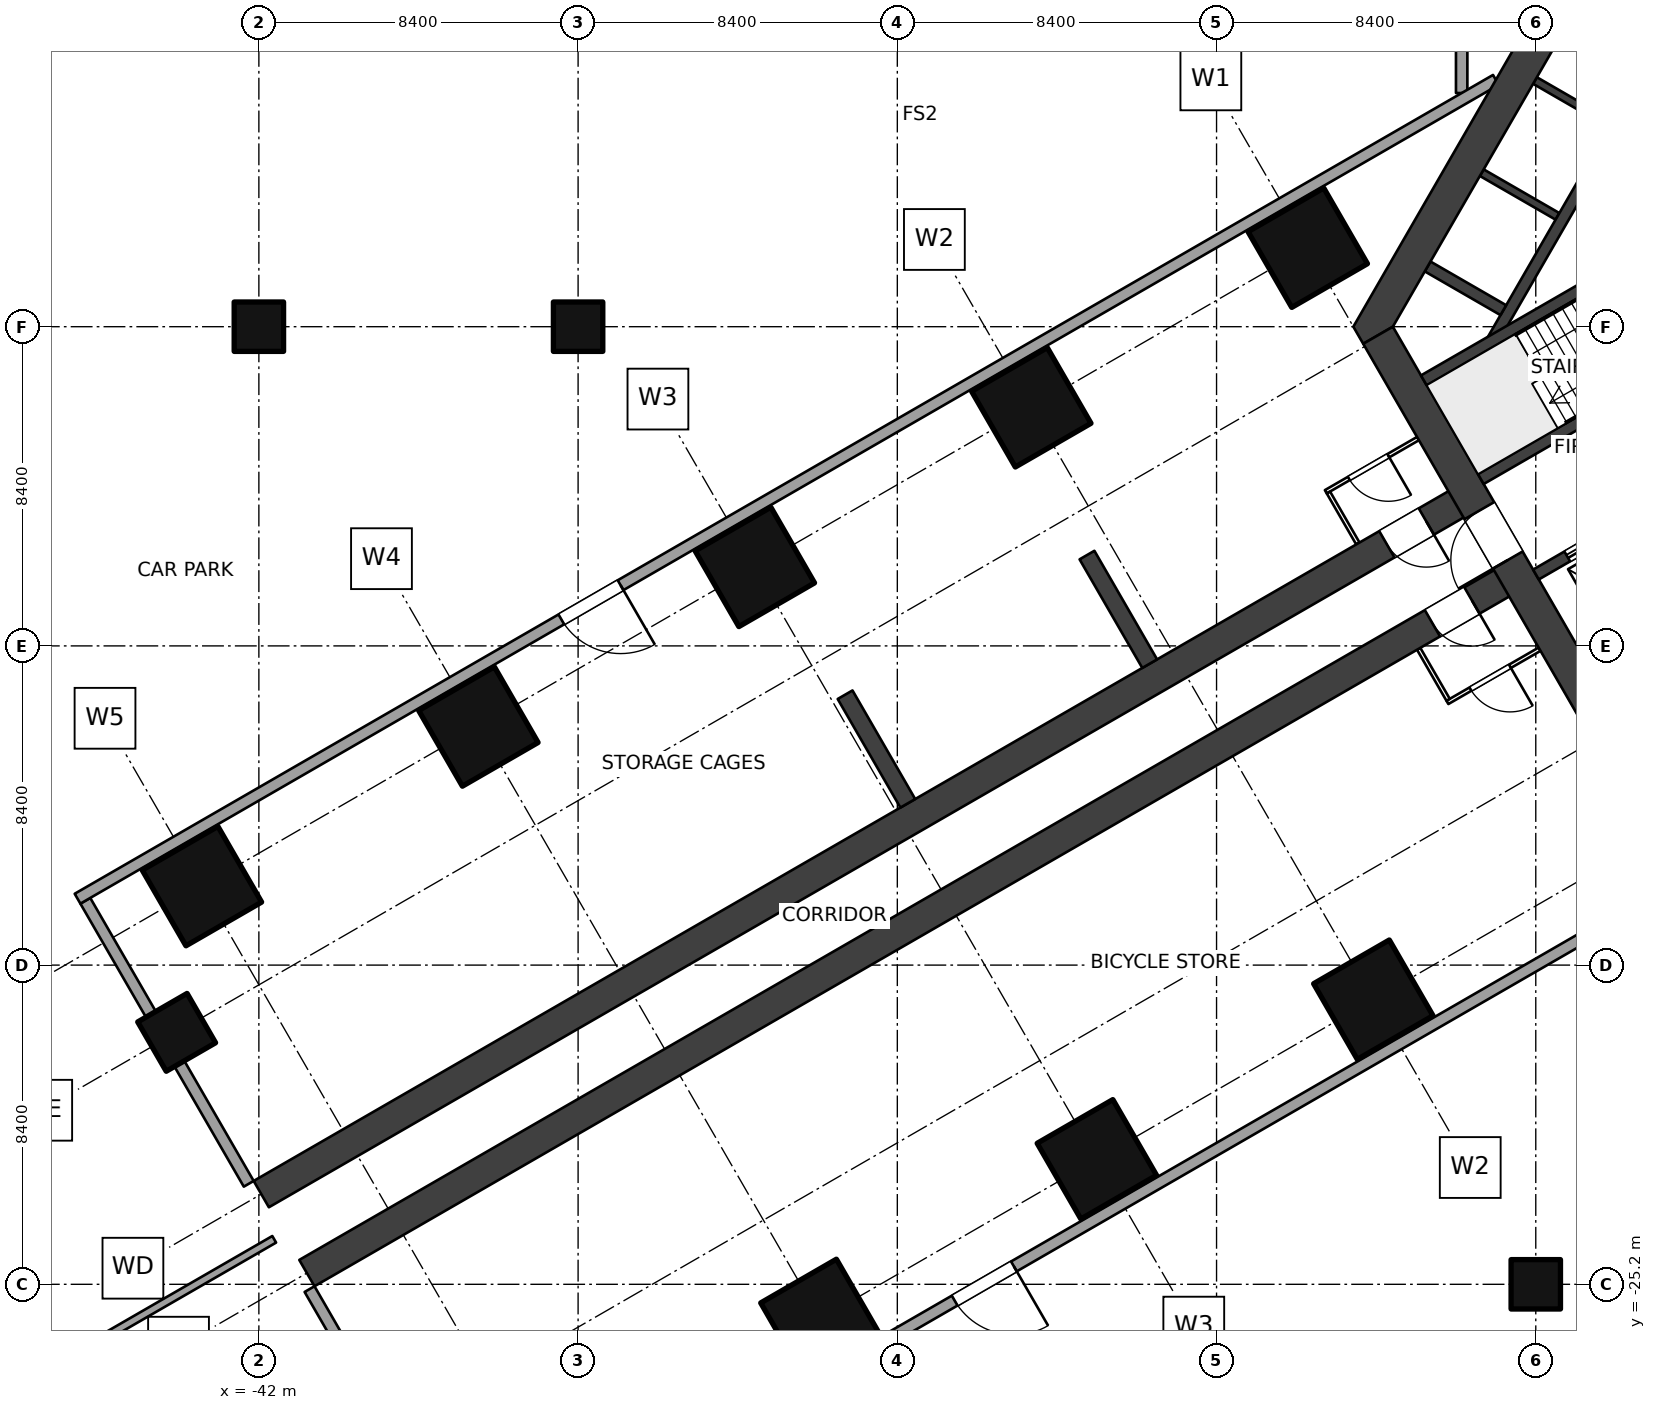
"""IFC4 building model, lengths in metres.
Left out: names, types, materials, properties, quantities, classifications, styles, units other than length and angle.
Written with IfcOpenShell. Run it as: python <this file> out.ifc"""

import sys

from ifc_helpers import new_model, si_unit, direction, frame, frame_2d, origin, origin_2d, place, context, subcontext, project, spatial, polyline, rectangle, outline, extrude, element, fill, save


model = new_model("IFC4")
c1 = context("Model", 3, precision=1e-05, world=origin(), true_north=direction((0.0, 1.0)))
c2 = subcontext(c1, "Body", "Model", "MODEL_VIEW")
j1 = project(units=[si_unit("LENGTHUNIT", "METRE"), si_unit("PLANEANGLEUNIT", "RADIAN")], contexts=[c1])
p1 = place(None, origin())
s1 = spatial("IfcSite", under=j1, at=p1, CompositionType="ELEMENT")
p2 = place(p1, origin())
s2 = spatial("IfcBuilding", under=s1, at=p2, CompositionType="ELEMENT")
p3 = place(p2, frame((0.0, 0.0, -3.5)))
s3 = spatial("IfcBuildingStorey", under=s2, at=p3, CompositionType="ELEMENT", Elevation=-3.5)
for number, where, z_axis, x_axis in (
    (1, (-14.4, 2.078, 0.0), (0.0, 0.0, 1.0), (-0.5, 0.866, 0.0)),
    (2, (-12.675, -17.71, 0.0), (0.0, 0.0, 1.0), (-0.5, 0.866, 0.0)),
    (3, (-21.675, -2.122, 0.0), (0.0, 0.0, 1.0), (-0.5, 0.866, 0.0)),
    (4, (-19.949, -21.91, 0.0), (0.0, 0.0, 1.0), (-0.5, 0.866, 0.0)),
    (5, (-28.949, -6.322, 0.0), (0.0, 0.0, 1.0), (-0.5, 0.866, 0.0)),
    (6, (-27.224, -26.11, 0.0), (0.0, 0.0, 1.0), (-0.5, 0.866, 0.0)),
    (7, (-36.224, -10.521, 0.0), (0.0, 0.0, 1.0), (-0.5, 0.866, 0.0)),
    (8, (-43.499, -14.721, 0.0), (0.0, 0.0, 1.0), (-0.5, 0.866, 0.0)),
):
    element("IfcColumn", number, at=place(p3, frame(where, z_axis=z_axis, x_axis=x_axis)), inside=s3, PredefinedType="COLUMN", context=c2, shape_type="SweptSolid", body=[
        extrude(rectangle(XDim=2.3, YDim=2.3, at=origin_2d()), origin(), (0.0, 0.0, 1.0), 3.5),
    ])
p4 = place(p3, frame((-44.164, -18.57, 0.0), z_axis=(0.0, 0.0, 1.0), x_axis=(-0.5, 0.866025403784, 0.0)))
e9 = element("IfcColumn", 9, at=p4, inside=s3, PredefinedType="COLUMN", context=c2, shape_type="SweptSolid", body=[
    extrude(rectangle(XDim=1.5, YDim=1.5, at=origin_2d()), origin(), (0.0, 0.0, 1.0), 3.5),
])
for number, where, z_axis, x_axis in (
    (10, (-42.0, 0.0, 0.0), (0.0, 0.0, 1.0), (1.0, 0.0, 0.0)),
    (11, (-33.6, 0.0, 0.0), (0.0, 0.0, 1.0), (1.0, 0.0, 0.0)),
    (12, (-8.4, -25.2, 0.0), (0.0, 0.0, 1.0), (1.0, 0.0, 0.0)),
):
    element("IfcColumn", number, at=place(p3, frame(where, z_axis=z_axis, x_axis=x_axis)), inside=s3, PredefinedType="COLUMN", context=c2, shape_type="SweptSolid", body=[
        extrude(rectangle(XDim=1.3, YDim=1.3, at=origin_2d()), origin(), (0.0, 0.0, 1.0), 3.5),
    ])
p5 = place(p3, frame((-6.47, -10.757, 0.0), z_axis=(0.0, 0.0, 1.0), x_axis=(-0.499997612506, 0.8660267822, 0.0)))
e13 = element("IfcWall", 13, at=p5, inside=s3, PredefinedType="SHEAR", context=c2, shape_type="SweptSolid", body=[
    extrude(rectangle(XDim=12.161, YDim=0.9, at=frame_2d((6.08, 0.0))), origin(), (0.0, 0.0, 1.0), 3.5),
])
p6 = place(p5, frame((5.33, 0.0, 0.0)))
e14 = element("IfcOpeningElement", 14, at=p6, cuts=e13, PredefinedType="OPENING", context=c2, shape_type="SweptSolid", body=[
    extrude(rectangle(XDim=1.5, YDim=2.1, at=frame_2d((0.75, 1.05))), frame((0.0, 0.46, 0.0), z_axis=(0.0, -1.0, 0.0), x_axis=(1.0, 0.0, 0.0)), (0.0, 0.0, 1.0), 0.92),
])
p7 = place(p3, origin())
e15 = element("IfcWall", 15, at=p7, inside=s3, PredefinedType="SHEAR", context=c2, shape_type="SweptSolid", body=[
    extrude(outline(polyline([(-6.6, 11.432), (-13.2, 0.0), (-12.94, -0.45), (-12.161, 0.0), (-6.08, 10.531), (-6.08, 11.432), (-6.6, 11.432)])), origin(), (0.0, 0.0, 1.0), 3.5),
])
p8 = place(p3, frame((-3.869, -0.559, 0.0), z_axis=(0.0, 0.0, 1.0), x_axis=(-0.86602711848, -0.499997030048, 0.0)))
e16 = element("IfcWall", 16, at=p8, inside=s3, PredefinedType="SHEAR", context=c2, shape_type="SweptSolid", body=[
    extrude(rectangle(XDim=6.901, YDim=0.3, at=frame_2d((3.451, 0.0))), origin(), (0.0, 0.0, 1.0), 3.5),
])
p9 = place(p8, frame((0.25, 0.0, 0.0)))
e17 = element("IfcOpeningElement", 17, at=p9, cuts=e16, PredefinedType="OPENING", context=c2, shape_type="SweptSolid", body=[
    extrude(rectangle(XDim=1.0, YDim=2.1, at=frame_2d((0.5, 1.05))), frame((0.0, 0.16, 0.0), z_axis=(0.0, -1.0, 0.0), x_axis=(1.0, 0.0, 0.0)), (0.0, 0.0, 1.0), 0.32),
])
p10 = place(p3, frame((-5.369, 2.039, 0.0), z_axis=(0.0, 0.0, 1.0), x_axis=(-0.86602711848, -0.499997030048, 0.0)))
e18 = element("IfcWall", 18, at=p10, inside=s3, PredefinedType="SHEAR", context=c2, shape_type="SweptSolid", body=[
    extrude(rectangle(XDim=6.901, YDim=0.3, at=frame_2d((3.451, 0.0))), origin(), (0.0, 0.0, 1.0), 3.5),
])
p11 = place(p3, frame((-2.419, -3.071, 0.0), z_axis=(0.0, 0.0, 1.0), x_axis=(-0.86602711848, -0.499997030048, 0.0)))
e19 = element("IfcWall", 19, at=p11, inside=s3, PredefinedType="SHEAR", context=c2, shape_type="SweptSolid", body=[
    extrude(rectangle(XDim=6.901, YDim=0.3, at=frame_2d((3.451, 0.0))), origin(), (0.0, 0.0, 1.0), 3.5),
])
p12 = place(p11, frame((4.85, 0.0, 0.0)))
e20 = element("IfcOpeningElement", 20, at=p12, cuts=e19, PredefinedType="OPENING", context=c2, shape_type="SweptSolid", body=[
    extrude(rectangle(XDim=1.1, YDim=2.1, at=frame_2d((0.55, 1.05))), frame((0.0, 0.16, 0.0), z_axis=(0.0, -1.0, 0.0), x_axis=(1.0, 0.0, 0.0)), (0.0, 0.0, 1.0), 0.32),
])
p13 = place(p3, frame((-9.548, -0.374, 0.0), z_axis=(0.0, 0.0, 1.0), x_axis=(0.500002290144, 0.866024081565, 0.0)))
e21 = element("IfcWall", 21, at=p13, inside=s3, PredefinedType="SHEAR", context=c2, shape_type="SweptSolid", body=[
    extrude(rectangle(XDim=10.195, YDim=0.3, at=frame_2d((5.098, 0.0))), origin(), (0.0, 0.0, 1.0), 3.5),
])
p14 = place(p3, frame((-9.254, 0.435, 0.0), z_axis=(0.0, 0.0, 1.0), x_axis=(-0.866007057882, 0.500031774688, 0.0)))
e22 = element("IfcWall", 22, at=p14, inside=s3, PredefinedType="SHEAR", context=c2, shape_type="SweptSolid", body=[
    extrude(rectangle(XDim=2.3, YDim=0.3, at=frame_2d((1.15, 0.0))), origin(), (0.0, 0.0, 1.0), 3.5),
])
for number, where, z_axis, x_axis in (
    (23, (-7.829, 2.903, 0.0), (0.0, 0.0, 1.0), (-0.866, 0.5, 0.0)),
    (24, (-6.429, 5.328, 0.0), (0.0, 0.0, 1.0), (-0.866, 0.5, 0.0)),
):
    element("IfcWall", number, at=place(p3, frame(where, z_axis=z_axis, x_axis=x_axis)), inside=s3, PredefinedType="SHEAR", context=c2, shape_type="SweptSolid", body=[
        extrude(rectangle(XDim=2.3, YDim=0.2, at=frame_2d((1.15, 0.0))), origin(), (0.0, 0.0, 1.0), 3.5),
    ])
p15 = place(p3, frame((-8.91, -6.53, 0.0), z_axis=(0.0, 0.0, 1.0), x_axis=(-0.866025284237, -0.500000207062, 0.0)))
e25 = element("IfcWall", 25, at=p15, inside=s3, PredefinedType="SHEAR", context=c2, shape_type="SweptSolid", body=[
    extrude(rectangle(XDim=36.75, YDim=0.8, at=frame_2d((18.375, 0.0))), origin(), (0.0, 0.0, 1.0), 3.5),
])
p16 = place(p15, frame((1.35, 0.0, 0.0)))
e26 = element("IfcOpeningElement", 26, at=p16, cuts=e25, PredefinedType="OPENING", context=c2, shape_type="SweptSolid", body=[
    extrude(rectangle(XDim=1.2, YDim=2.1, at=frame_2d((0.6, 1.05))), frame((0.0, 0.41, 0.0), z_axis=(0.0, -1.0, 0.0), x_axis=(1.0, 0.0, 0.0)), (0.0, 0.0, 1.0), 0.82),
])
p17 = place(p3, frame((-10.11, -4.451, 0.0), z_axis=(0.0, 0.0, 1.0), x_axis=(-0.866025284237, -0.500000207062, 0.0)))
e27 = element("IfcWall", 27, at=p17, inside=s3, PredefinedType="SHEAR", context=c2, shape_type="SweptSolid", body=[
    extrude(rectangle(XDim=36.75, YDim=0.8, at=frame_2d((18.375, 0.0))), origin(), (0.0, 0.0, 1.0), 3.5),
])
p18 = place(p17, frame((1.35, 0.0, 0.0)))
e28 = element("IfcOpeningElement", 28, at=p18, cuts=e27, PredefinedType="OPENING", context=c2, shape_type="SweptSolid", body=[
    extrude(rectangle(XDim=1.2, YDim=2.1, at=frame_2d((0.6, 1.05))), frame((0.0, 0.41, 0.0), z_axis=(0.0, -1.0, 0.0), x_axis=(1.0, 0.0, 0.0)), (0.0, 0.0, 1.0), 0.82),
])
p19 = place(p3, frame((-8.3, -8.487, 0.0), z_axis=(0.0, 0.0, 1.0), x_axis=(-0.866034573852, -0.49998411664, 0.0)))
e29 = element("IfcWall", 29, at=p19, inside=s3, PredefinedType="PARTITIONING", context=c2, shape_type="SweptSolid", body=[
    extrude(rectangle(XDim=2.8, YDim=0.1, at=frame_2d((1.4, 0.0))), origin(), (0.0, 0.0, 1.0), 3.15),
])
p20 = place(p19, frame((0.9, 0.0, 0.0)))
e30 = element("IfcOpeningElement", 30, at=p20, cuts=e29, PredefinedType="OPENING", context=c2, shape_type="SweptSolid", body=[
    extrude(rectangle(XDim=1.2, YDim=2.1, at=frame_2d((0.6, 1.05))), frame((0.0, 0.06, 0.0), z_axis=(0.0, -1.0, 0.0), x_axis=(1.0, 0.0, 0.0)), (0.0, 0.0, 1.0), 0.12),
])
p21 = place(p3, frame((-11.482, -8.476, 0.0), z_axis=(0.0, 0.0, 1.0), x_axis=(0.500017819788, -0.86601511528, 0.0)))
e31 = element("IfcWall", 31, at=p21, inside=s3, PredefinedType="PARTITIONING", context=c2, shape_type="SweptSolid", body=[
    extrude(rectangle(XDim=1.55, YDim=0.1, at=frame_2d((0.775, 0.0))), origin(), (0.0, 0.0, 1.0), 3.15),
])
p22 = place(p3, frame((-11.5, -2.945, 0.0), z_axis=(0.0, 0.0, 1.0), x_axis=(-0.866034573852, -0.49998411664, 0.0)))
e32 = element("IfcWall", 32, at=p22, inside=s3, PredefinedType="PARTITIONING", context=c2, shape_type="SweptSolid", body=[
    extrude(rectangle(XDim=2.8, YDim=0.1, at=frame_2d((1.4, 0.0))), origin(), (0.0, 0.0, 1.0), 3.15),
])
p23 = place(p22, frame((0.9, 0.0, 0.0)))
e33 = element("IfcOpeningElement", 33, at=p23, cuts=e32, PredefinedType="OPENING", context=c2, shape_type="SweptSolid", body=[
    extrude(rectangle(XDim=1.2, YDim=2.1, at=frame_2d((0.6, 1.05))), frame((0.0, 0.06, 0.0), z_axis=(0.0, -1.0, 0.0), x_axis=(1.0, 0.0, 0.0)), (0.0, 0.0, 1.0), 0.12),
])
p24 = place(p3, frame((-13.082, -5.705, 0.0), z_axis=(0.0, 0.0, 1.0), x_axis=(-0.500086022567, 0.865975732936, 0.0)))
e34 = element("IfcWall", 34, at=p24, inside=s3, PredefinedType="PARTITIONING", context=c2, shape_type="SweptSolid", body=[
    extrude(rectangle(XDim=1.55, YDim=0.1, at=frame_2d((0.775, 0.0))), origin(), (0.0, 0.0, 1.0), 3.15),
])
p25 = place(p3, frame((-41.596, -24.016, 0.0), z_axis=(0.0, 0.0, 1.0), x_axis=(-0.866034858292, -0.499983623955, 0.0)))
e35 = element("IfcWall", 35, at=p25, inside=s3, PredefinedType="SOLIDWALL", context=c2, shape_type="SweptSolid", body=[
    extrude(rectangle(XDim=10.627, YDim=0.2, at=frame_2d((5.313, 0.0))), origin(), (0.0, 0.0, 1.0), 3.15),
])
for number, where, z_axis, x_axis in (
    (36, (-40.667, -25.326, 0.0), (0.0, 0.0, 1.0), (0.5, -0.866, 0.0)),
    (37, (-42.267, -22.555, 0.0), (0.0, 0.0, 1.0), (-0.5, 0.866, 0.0)),
):
    element("IfcWall", number, at=place(p3, frame(where, z_axis=z_axis, x_axis=x_axis)), inside=s3, PredefinedType="SOLIDWALL", context=c2, shape_type="SweptSolid", body=[
        extrude(rectangle(XDim=8.6, YDim=0.3, at=frame_2d((4.3, 0.0))), origin(), (0.0, 0.0, 1.0), 1.55),
    ])
p26 = place(p3, frame((-10.35, 6.149, 0.0), z_axis=(0.0, 0.0, 1.0), x_axis=(0.0, 1.0, 0.0)))
e38 = element("IfcWall", 38, at=p26, inside=s3, PredefinedType="SOLIDWALL", context=c2, shape_type="SweptSolid", body=[
    extrude(rectangle(XDim=41.883, YDim=0.3, at=frame_2d((20.941, 0.0))), origin(), (0.0, 0.0, 1.0), 3.15),
])
p27 = place(p26, frame((25.383, 0.0, 0.0)))
e39 = element("IfcOpeningElement", 39, at=p27, cuts=e38, PredefinedType="OPENING", context=c2, shape_type="SweptSolid", body=[
    extrude(rectangle(XDim=1.8, YDim=2.4, at=frame_2d((0.9, 1.2))), frame((0.0, 0.16, 0.0), z_axis=(0.0, -1.0, 0.0), x_axis=(1.0, 0.0, 0.0)), (0.0, 0.0, 1.0), 0.32),
])
p28 = place(p3, frame((-0.15, -12.038, 0.0), z_axis=(0.0, 0.0, 1.0), x_axis=(-0.866026292622, -0.499998460486, 0.0)))
e40 = element("IfcWall", 40, at=p28, inside=s3, PredefinedType="SOLIDWALL", context=c2, shape_type="SweptSolid", body=[
    extrude(rectangle(XDim=41.883, YDim=0.3, at=frame_2d((20.941, 0.0))), origin(), (0.0, 0.0, 1.0), 3.15),
])
p29 = place(p28, frame((25.383, 0.0, 0.0)))
e41 = element("IfcOpeningElement", 41, at=p29, cuts=e40, PredefinedType="OPENING", context=c2, shape_type="SweptSolid", body=[
    extrude(rectangle(XDim=1.8, YDim=2.4, at=frame_2d((0.9, 1.2))), frame((0.0, 0.16, 0.0), z_axis=(0.0, -1.0, 0.0), x_axis=(1.0, 0.0, 0.0)), (0.0, 0.0, 1.0), 0.32),
])
p30 = place(p3, frame((-9.45, 6.495, 0.0), z_axis=(0.0, 0.0, 1.0), x_axis=(-0.866025301493, -0.500000177174, 0.0)))
e42 = element("IfcWall", 42, at=p30, inside=s3, PredefinedType="SOLIDWALL", context=c2, shape_type="SweptSolid", body=[
    extrude(rectangle(XDim=43.095, YDim=0.3, at=frame_2d((21.548, 0.0))), origin(), (0.0, 0.0, 1.0), 3.15),
])
p31 = place(p30, frame((26.595, 0.0, 0.0)))
e43 = element("IfcOpeningElement", 43, at=p31, cuts=e42, PredefinedType="OPENING", context=c2, shape_type="SweptSolid", body=[
    extrude(rectangle(XDim=1.8, YDim=2.4, at=frame_2d((0.9, 1.2))), frame((0.0, 0.16, 0.0), z_axis=(0.0, -1.0, 0.0), x_axis=(1.0, 0.0, 0.0)), (0.0, 0.0, 1.0), 0.32),
])
for number, where, z_axis, x_axis in (
    (44, (-18.559, -8.868, 0.0), (0.0, 0.0, 1.0), (-0.5, 0.866, 0.0)),
    (45, (-24.925, -12.543, 0.0), (0.0, 0.0, 1.0), (-0.5, 0.866, 0.0)),
):
    element("IfcWall", number, at=place(p3, frame(where, z_axis=z_axis, x_axis=x_axis)), inside=s3, PredefinedType="SOLIDWALL", context=c2, shape_type="SweptSolid", body=[
        extrude(rectangle(XDim=3.3, YDim=0.45, at=frame_2d((1.65, 0.0))), origin(), (0.0, 0.0, 1.0), 3.5),
    ])
p32 = place(p12, origin())
e46 = element("IfcDoor", 46, at=p32, inside=s3, OperationType="DOUBLE_DOOR_SLIDING", PredefinedType="DOOR", context=c2, shape_type="SweptSolid", body=[
    extrude(rectangle(XDim=1.1, YDim=2.1, at=frame_2d((0.55, 1.05))), frame((0.0, 0.025, 0.0), z_axis=(0.0, -1.0, 0.0), x_axis=(1.0, 0.0, 0.0)), (0.0, 0.0, 1.0), 0.05),
])
fill(e20, e46)
p33 = place(p6, origin())
e47 = element("IfcDoor", 47, at=p33, inside=s3, OperationType="DOUBLE_DOOR_DOUBLE_SWING", PredefinedType="DOOR", context=c2, shape_type="SweptSolid", body=[
    extrude(rectangle(XDim=1.5, YDim=2.1, at=frame_2d((0.75, 1.05))), frame((0.0, 0.025, 0.0), z_axis=(0.0, -1.0, 0.0), x_axis=(1.0, 0.0, 0.0)), (0.0, 0.0, 1.0), 0.05),
])
fill(e14, e47)
p34 = place(p16, origin())
e48 = element("IfcDoor", 48, at=p34, inside=s3, OperationType="DOUBLE_SWING_LEFT", PredefinedType="DOOR", context=c2, shape_type="SweptSolid", body=[
    extrude(rectangle(XDim=1.2, YDim=2.1, at=frame_2d((0.6, 1.05))), frame((0.0, 0.025, 0.0), z_axis=(0.0, -1.0, 0.0), x_axis=(1.0, 0.0, 0.0)), (0.0, 0.0, 1.0), 0.05),
])
fill(e26, e48)
p35 = place(p20, origin())
e49 = element("IfcDoor", 49, at=p35, inside=s3, OperationType="DOUBLE_SWING_LEFT", PredefinedType="DOOR", context=c2, shape_type="SweptSolid", body=[
    extrude(rectangle(XDim=1.2, YDim=2.1, at=frame_2d((0.6, 1.05))), frame((0.0, 0.025, 0.0), z_axis=(0.0, -1.0, 0.0), x_axis=(1.0, 0.0, 0.0)), (0.0, 0.0, 1.0), 0.05),
])
fill(e30, e49)
p36 = place(p18, origin())
e50 = element("IfcDoor", 50, at=p36, inside=s3, OperationType="DOUBLE_SWING_LEFT", PredefinedType="DOOR", context=c2, shape_type="SweptSolid", body=[
    extrude(rectangle(XDim=1.2, YDim=2.1, at=frame_2d((0.6, 1.05))), frame((0.0, 0.025, 0.0), z_axis=(0.0, -1.0, 0.0), x_axis=(1.0, 0.0, 0.0)), (0.0, 0.0, 1.0), 0.05),
])
fill(e28, e50)
p37 = place(p23, origin())
e51 = element("IfcDoor", 51, at=p37, inside=s3, OperationType="DOUBLE_SWING_LEFT", PredefinedType="DOOR", context=c2, shape_type="SweptSolid", body=[
    extrude(rectangle(XDim=1.2, YDim=2.1, at=frame_2d((0.6, 1.05))), frame((0.0, 0.025, 0.0), z_axis=(0.0, -1.0, 0.0), x_axis=(1.0, 0.0, 0.0)), (0.0, 0.0, 1.0), 0.05),
])
fill(e33, e51)
p38 = place(p29, origin())
e52 = element("IfcDoor", 52, at=p38, inside=s3, OperationType="DOUBLE_DOOR_DOUBLE_SWING", PredefinedType="DOOR", context=c2, shape_type="SweptSolid", body=[
    extrude(rectangle(XDim=1.8, YDim=2.4, at=frame_2d((0.9, 1.2))), frame((0.0, 0.025, 0.0), z_axis=(0.0, -1.0, 0.0), x_axis=(1.0, 0.0, 0.0)), (0.0, 0.0, 1.0), 0.05),
])
fill(e41, e52)
p39 = place(p31, origin())
e53 = element("IfcDoor", 53, at=p39, inside=s3, OperationType="DOUBLE_DOOR_DOUBLE_SWING", PredefinedType="DOOR", context=c2, shape_type="SweptSolid", body=[
    extrude(rectangle(XDim=1.8, YDim=2.4, at=frame_2d((0.9, 1.2))), frame((0.0, 0.025, 0.0), z_axis=(0.0, -1.0, 0.0), x_axis=(1.0, 0.0, 0.0)), (0.0, 0.0, 1.0), 0.05),
])
fill(e43, e53)
save(model, sys.argv[1])
